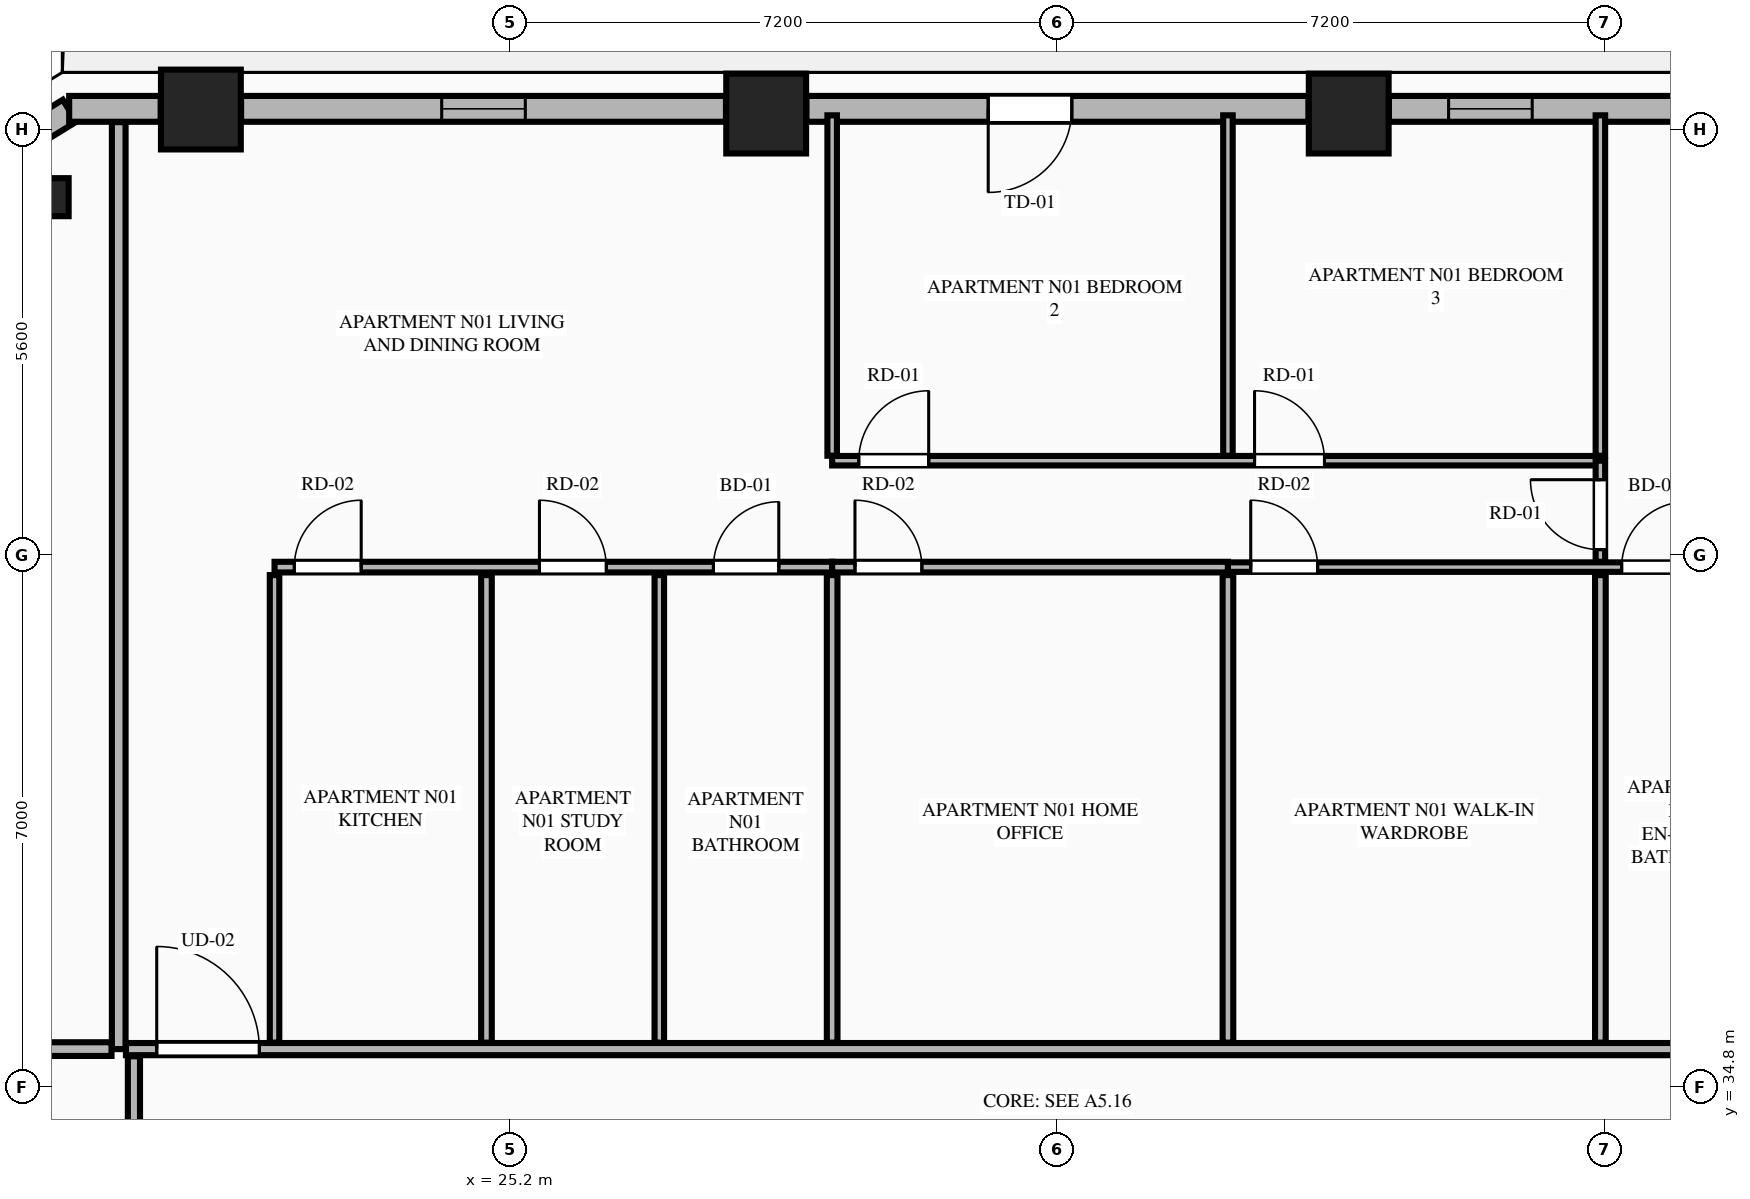
"""IFC4 building model, lengths in metres.
Left out: names, types, materials, properties, quantities, classifications, styles, units other than length and angle.
Written with IfcOpenShell. Run it as: python <this file> out.ifc"""

import sys

from ifc_helpers import new_model, si_unit, direction, frame, frame_2d, origin, origin_2d, place, context, subcontext, project, spatial, rectangle, extrude, element, fill, save


model = new_model("IFC4")
c1 = context("Model", 3, precision=1e-05, world=origin(), true_north=direction((0.0, 1.0)))
c2 = subcontext(c1, "Body", "Model", "MODEL_VIEW")
j1 = project(units=[si_unit("LENGTHUNIT", "METRE"), si_unit("PLANEANGLEUNIT", "RADIAN")], contexts=[c1])
p1 = place(None, origin())
s1 = spatial("IfcSite", under=j1, at=p1, CompositionType="ELEMENT")
p2 = place(p1, origin())
s2 = spatial("IfcBuilding", under=s1, at=p2, CompositionType="ELEMENT")
p3 = place(p2, frame((0.0, 0.0, 141.0)))
s3 = spatial("IfcBuildingStorey", under=s2, at=p3, CompositionType="ELEMENT", Elevation=141.0)
for number, where, z_axis, x_axis in (
    (1, (36.232, 47.608, 0.0), (0.0, 0.0, 1.0), (1.0, 0.0, 0.0)),
    (2, (28.568, 47.608, 0.0), (0.0, 0.0, 1.0), (1.0, 0.0, 0.0)),
    (3, (21.131, 47.661, 0.0), (0.0, 0.0, 1.0), (1.0, 0.0, 0.0)),
):
    element("IfcColumn", number, at=place(p3, frame(where, z_axis=z_axis, x_axis=x_axis)), inside=s3, PredefinedType="COLUMN", context=c2, shape_type="SweptSolid", body=[
        extrude(rectangle(XDim=1.05, YDim=1.05, at=origin_2d()), origin(), (0.0, 0.0, 1.0), 3.55),
    ])
p4 = place(p3, frame((19.141, 46.508, 0.0), z_axis=(0.0, 0.0, 1.0), x_axis=(-0.865160173452, -0.501495637342, 0.0)))
e4 = element("IfcColumn", 4, at=p4, inside=s3, PredefinedType="PILASTER", context=c2, shape_type="SweptSolid", body=[
    extrude(rectangle(XDim=0.5, YDim=0.35, at=origin_2d()), origin(), (0.0, 0.0, 1.0), 3.55),
])
p5 = place(p3, frame((19.403, 47.645, 0.0), z_axis=(0.0, 0.0, 1.0), x_axis=(-0.851798915137, -0.523868884523, 0.0)))
e5 = element("IfcWall", 5, at=p5, inside=s3, PredefinedType="STANDARD", context=c2, shape_type="SweptSolid", body=[
    extrude(rectangle(XDim=1.848, YDim=0.34, at=frame_2d((0.924, 0.0))), origin(), (0.0, 0.0, 1.0), 3.34),
])
p6 = place(p3, frame((43.14, 47.67, 0.0), z_axis=(0.0, 0.0, 1.0), x_axis=(-1.0, 0.0, 0.0)))
e6 = element("IfcWall", 6, at=p6, inside=s3, PredefinedType="STANDARD", context=c2, shape_type="SweptSolid", body=[
    extrude(rectangle(XDim=6.379, YDim=0.34, at=frame_2d((3.189, 0.0))), origin(), (0.0, 0.0, 1.0), 2.797),
])
p7 = place(p6, frame((1.192, 0.0, 0.75)))
e7 = element("IfcOpeningElement", 7, at=p7, cuts=e6, PredefinedType="OPENING", context=c2, shape_type="SweptSolid", body=[
    extrude(rectangle(XDim=1.1, YDim=1.897, at=frame_2d((0.55, 0.948))), frame((0.0, 0.18, 0.0), z_axis=(0.0, -1.0, 0.0), x_axis=(1.0, 0.0, 0.0)), (0.0, 0.0, 1.0), 0.36),
])
p8 = place(p6, frame((4.494, 0.0, 0.75)))
e8 = element("IfcOpeningElement", 8, at=p8, cuts=e6, PredefinedType="OPENING", context=c2, shape_type="SweptSolid", body=[
    extrude(rectangle(XDim=1.1, YDim=1.897, at=frame_2d((0.55, 0.948))), frame((0.0, 0.18, 0.0), z_axis=(0.0, -1.0, 0.0), x_axis=(1.0, 0.0, 0.0)), (0.0, 0.0, 1.0), 0.36),
])
p9 = place(p3, frame((35.703, 47.67, 0.0), z_axis=(0.0, 0.0, 1.0), x_axis=(-1.0, 0.0, 0.0)))
e9 = element("IfcWall", 9, at=p9, inside=s3, PredefinedType="STANDARD", context=c2, shape_type="SweptSolid", body=[
    extrude(rectangle(XDim=6.606, YDim=0.34, at=frame_2d((3.303, 0.0))), origin(), (0.0, 0.0, 1.0), 2.797),
])
p10 = place(p9, frame((3.114, 0.0, 0.0)))
e10 = element("IfcOpeningElement", 10, at=p10, cuts=e9, PredefinedType="OPENING", context=c2, shape_type="SweptSolid", body=[
    extrude(rectangle(XDim=1.1, YDim=2.25, at=frame_2d((0.55, 1.125))), frame((0.0, 0.18, 0.0), z_axis=(0.0, -1.0, 0.0), x_axis=(1.0, 0.0, 0.0)), (0.0, 0.0, 1.0), 0.36),
])
p11 = place(p3, frame((28.039, 47.67, 0.0), z_axis=(0.0, 0.0, 1.0), x_axis=(-1.0, 0.0, 0.0)))
e11 = element("IfcWall", 11, at=p11, inside=s3, PredefinedType="STANDARD", context=c2, shape_type="SweptSolid", body=[
    extrude(rectangle(XDim=6.379, YDim=0.34, at=frame_2d((3.189, 0.0))), origin(), (0.0, 0.0, 1.0), 2.797),
])
p12 = place(p11, frame((2.64, 0.0, 0.75)))
e12 = element("IfcOpeningElement", 12, at=p12, cuts=e11, PredefinedType="OPENING", context=c2, shape_type="SweptSolid", body=[
    extrude(rectangle(XDim=1.1, YDim=1.897, at=frame_2d((0.55, 0.948))), frame((0.0, 0.18, 0.0), z_axis=(0.0, -1.0, 0.0), x_axis=(1.0, 0.0, 0.0)), (0.0, 0.0, 1.0), 0.36),
])
p13 = place(p3, frame((20.602, 47.67, 0.0), z_axis=(0.0, 0.0, 1.0), x_axis=(-1.0, 0.0, 0.0)))
e13 = element("IfcWall", 13, at=p13, inside=s3, PredefinedType="STANDARD", context=c2, shape_type="SweptSolid", body=[
    extrude(rectangle(XDim=1.204, YDim=0.34, at=frame_2d((0.602, 0.0))), origin(), (0.0, 0.0, 1.0), 3.34),
])
p14 = place(p3, frame((20.05, 35.3, 0.0), z_axis=(0.0, 0.0, 1.0), x_axis=(0.0, 1.0, 0.0)))
e14 = element("IfcWall", 14, at=p14, inside=s3, PredefinedType="PARTITIONING", context=c2, shape_type="SweptSolid", body=[
    extrude(rectangle(XDim=12.195, YDim=0.18, at=frame_2d((6.098, 0.0))), origin(), (0.0, 0.0, 1.0), 3.34),
])
p15 = place(p3, frame((20.145, 35.3, 0.0), z_axis=(0.0, 0.0, 1.0), x_axis=(1.0, 0.0, 0.0)))
e15 = element("IfcWall", 15, at=p15, inside=s3, PredefinedType="PARTITIONING", context=c2, shape_type="SweptSolid", body=[
    extrude(rectangle(XDim=24.51, YDim=0.16, at=frame_2d((12.255, 0.0))), origin(), (0.0, 0.0, 1.0), 3.34),
])
p16 = place(p15, frame((0.405, 0.0, 0.0)))
e16 = element("IfcOpeningElement", 16, at=p16, cuts=e15, PredefinedType="OPENING", context=c2, shape_type="SweptSolid", body=[
    extrude(rectangle(XDim=1.35, YDim=2.35, at=frame_2d((0.675, 1.175))), frame((0.0, 0.09, 0.0), z_axis=(0.0, -1.0, 0.0), x_axis=(1.0, 0.0, 0.0)), (0.0, 0.0, 1.0), 0.18),
])
p17 = place(p3, frame((22.1, 35.385, 0.0), z_axis=(0.0, 0.0, 1.0), x_axis=(0.0, 1.0, 0.0)))
e17 = element("IfcWall", 17, at=p17, inside=s3, PredefinedType="PARTITIONING", context=c2, shape_type="SweptSolid", body=[
    extrude(rectangle(XDim=6.151, YDim=0.125, at=frame_2d((3.075, 0.0))), origin(), (0.0, 0.0, 1.0), 2.722),
])
p18 = place(p3, frame((22.1, 41.641, 0.0), z_axis=(0.0, 0.0, 1.0), x_axis=(1.0, 0.0, 0.0)))
e18 = element("IfcWall", 18, at=p18, inside=s3, PredefinedType="PLUMBINGWALL", context=c2, shape_type="SweptSolid", body=[
    extrude(rectangle(XDim=7.336, YDim=0.14, at=frame_2d((3.668, 0.0))), origin(), (0.0, 0.0, 1.0), 3.34),
])
p19 = place(p18, frame((5.774, 0.0, 0.0)))
e19 = element("IfcOpeningElement", 19, at=p19, cuts=e18, PredefinedType="OPENING", context=c2, shape_type="SweptSolid", body=[
    extrude(rectangle(XDim=0.86, YDim=2.1, at=frame_2d((0.43, 1.05))), frame((0.0, 0.08, 0.0), z_axis=(0.0, -1.0, 0.0), x_axis=(1.0, 0.0, 0.0)), (0.0, 0.0, 1.0), 0.16),
])
p20 = place(p18, frame((0.26, 0.0, 0.0)))
e20 = element("IfcOpeningElement", 20, at=p20, cuts=e18, PredefinedType="OPENING", context=c2, shape_type="SweptSolid", body=[
    extrude(rectangle(XDim=0.88, YDim=2.15, at=frame_2d((0.44, 1.075))), frame((0.0, 0.08, 0.0), z_axis=(0.0, -1.0, 0.0), x_axis=(1.0, 0.0, 0.0)), (0.0, 0.0, 1.0), 0.16),
])
p21 = place(p18, frame((3.485, 0.0, 0.0)))
e21 = element("IfcOpeningElement", 21, at=p21, cuts=e18, PredefinedType="OPENING", context=c2, shape_type="SweptSolid", body=[
    extrude(rectangle(XDim=0.88, YDim=2.15, at=frame_2d((0.44, 1.075))), frame((0.0, 0.08, 0.0), z_axis=(0.0, -1.0, 0.0), x_axis=(1.0, 0.0, 0.0)), (0.0, 0.0, 1.0), 0.16),
])
p22 = place(p3, frame((29.436, 41.641, 0.0), z_axis=(0.0, 0.0, 1.0), x_axis=(1.0, 0.0, 0.0)))
e22 = element("IfcWall", 22, at=p22, inside=s3, PredefinedType="PLUMBINGWALL", context=c2, shape_type="SweptSolid", body=[
    extrude(rectangle(XDim=5.207, YDim=0.14, at=frame_2d((2.604, 0.0))), origin(), (0.0, 0.0, 1.0), 3.34),
])
p23 = place(p22, frame((0.3, 0.0, 0.0)))
e23 = element("IfcOpeningElement", 23, at=p23, cuts=e22, PredefinedType="OPENING", context=c2, shape_type="SweptSolid", body=[
    extrude(rectangle(XDim=0.88, YDim=2.15, at=frame_2d((0.44, 1.075))), frame((0.0, 0.08, 0.0), z_axis=(0.0, -1.0, 0.0), x_axis=(1.0, 0.0, 0.0)), (0.0, 0.0, 1.0), 0.16),
])
p24 = place(p3, frame((34.643, 41.641, 0.0), z_axis=(0.0, 0.0, 1.0), x_axis=(1.0, 0.0, 0.0)))
e24 = element("IfcWall", 24, at=p24, inside=s3, PredefinedType="PARTITIONING", context=c2, shape_type="SweptSolid", body=[
    extrude(rectangle(XDim=10.012, YDim=0.125, at=frame_2d((5.006, 0.0))), origin(), (0.0, 0.0, 1.0), 3.34),
])
p25 = place(p24, frame((5.18, 0.0, 0.0)))
e25 = element("IfcOpeningElement", 25, at=p25, cuts=e24, PredefinedType="OPENING", context=c2, shape_type="SweptSolid", body=[
    extrude(rectangle(XDim=0.86, YDim=2.1, at=frame_2d((0.43, 1.05))), frame((0.0, 0.073, 0.0), z_axis=(0.0, -1.0, 0.0), x_axis=(1.0, 0.0, 0.0)), (0.0, 0.0, 1.0), 0.145),
])
p26 = place(p24, frame((7.413, 0.0, 0.0)))
e26 = element("IfcOpeningElement", 26, at=p26, cuts=e24, PredefinedType="OPENING", context=c2, shape_type="SweptSolid", body=[
    extrude(rectangle(XDim=0.88, YDim=2.15, at=frame_2d((0.44, 1.075))), frame((0.0, 0.073, 0.0), z_axis=(0.0, -1.0, 0.0), x_axis=(1.0, 0.0, 0.0)), (0.0, 0.0, 1.0), 0.145),
])
p27 = place(p24, frame((0.3, 0.0, 0.0)))
e27 = element("IfcOpeningElement", 27, at=p27, cuts=e24, PredefinedType="OPENING", context=c2, shape_type="SweptSolid", body=[
    extrude(rectangle(XDim=0.88, YDim=2.15, at=frame_2d((0.44, 1.075))), frame((0.0, 0.073, 0.0), z_axis=(0.0, -1.0, 0.0), x_axis=(1.0, 0.0, 0.0)), (0.0, 0.0, 1.0), 0.145),
])
p28 = place(p3, frame((24.888, 35.385, 0.0), z_axis=(0.0, 0.0, 1.0), x_axis=(0.0, 1.0, 0.0)))
e28 = element("IfcWall", 28, at=p28, inside=s3, PredefinedType="PLUMBINGWALL", context=c2, shape_type="SweptSolid", body=[
    extrude(rectangle(XDim=6.151, YDim=0.14, at=frame_2d((3.075, 0.0))), origin(), (0.0, 0.0, 1.0), 3.34),
])
p29 = place(p3, frame((27.162, 35.385, 0.0), z_axis=(0.0, 0.0, 1.0), x_axis=(0.0, 1.0, 0.0)))
e29 = element("IfcWall", 29, at=p29, inside=s3, PredefinedType="PARTITIONING", context=c2, shape_type="SweptSolid", body=[
    extrude(rectangle(XDim=6.151, YDim=0.125, at=frame_2d((3.075, 0.0))), origin(), (0.0, 0.0, 1.0), 3.34),
])
p30 = place(p3, frame((29.436, 43.106, 0.0), z_axis=(0.0, 0.0, 1.0), x_axis=(0.0, 1.0, 0.0)))
e30 = element("IfcWall", 30, at=p30, inside=s3, PredefinedType="PARTITIONING", context=c2, shape_type="SweptSolid", body=[
    extrude(rectangle(XDim=4.479, YDim=0.125, at=frame_2d((2.24, 0.0))), origin(), (0.0, 0.0, 1.0), 3.34),
])
p31 = place(p3, frame((29.436, 43.041, 0.0), z_axis=(0.0, 0.0, 1.0), x_axis=(1.0, 0.0, 0.0)))
e31 = element("IfcWall", 31, at=p31, inside=s3, PredefinedType="PARTITIONING", context=c2, shape_type="SweptSolid", body=[
    extrude(rectangle(XDim=10.107, YDim=0.125, at=frame_2d((5.053, 0.0))), origin(), (0.0, 0.0, 1.0), 3.34),
])
p32 = place(p31, frame((0.35, 0.0, 0.0)))
e32 = element("IfcOpeningElement", 32, at=p32, cuts=e31, PredefinedType="OPENING", context=c2, shape_type="SweptSolid", body=[
    extrude(rectangle(XDim=0.92, YDim=2.15, at=frame_2d((0.46, 1.075))), frame((0.0, 0.073, 0.0), z_axis=(0.0, -1.0, 0.0), x_axis=(1.0, 0.0, 0.0)), (0.0, 0.0, 1.0), 0.145),
])
p33 = place(p31, frame((5.557, 0.0, 0.0)))
e33 = element("IfcOpeningElement", 33, at=p33, cuts=e31, PredefinedType="OPENING", context=c2, shape_type="SweptSolid", body=[
    extrude(rectangle(XDim=0.92, YDim=2.15, at=frame_2d((0.46, 1.075))), frame((0.0, 0.073, 0.0), z_axis=(0.0, -1.0, 0.0), x_axis=(1.0, 0.0, 0.0)), (0.0, 0.0, 1.0), 0.145),
])
p34 = place(p3, frame((39.543, 41.711, 0.0), z_axis=(0.0, 0.0, 1.0), x_axis=(0.0, 1.0, 0.0)))
e34 = element("IfcWall", 34, at=p34, inside=s3, PredefinedType="PARTITIONING", context=c2, shape_type="SweptSolid", body=[
    extrude(rectangle(XDim=1.33, YDim=0.125, at=frame_2d((0.665, 0.0))), origin(), (0.0, 0.0, 1.0), 3.34),
])
p35 = place(p34, frame((0.16, 0.0, 0.0)))
e35 = element("IfcOpeningElement", 35, at=p35, cuts=e34, PredefinedType="OPENING", context=c2, shape_type="SweptSolid", body=[
    extrude(rectangle(XDim=0.92, YDim=2.15, at=frame_2d((0.46, 1.075))), frame((0.0, 0.073, 0.0), z_axis=(0.0, -1.0, 0.0), x_axis=(1.0, 0.0, 0.0)), (0.0, 0.0, 1.0), 0.145),
])
for number, where, z_axis, x_axis in (
    (36, (29.436, 35.385, 0.0), (0.0, 0.0, 1.0), (0.0, 1.0, 0.0)),
    (37, (34.643, 35.385, 0.0), (0.0, 0.0, 1.0), (0.0, 1.0, 0.0)),
):
    element("IfcWall", number, at=place(p3, frame(where, z_axis=z_axis, x_axis=x_axis)), inside=s3, PredefinedType="PLUMBINGWALL", context=c2, shape_type="SweptSolid", body=[
        extrude(rectangle(XDim=6.151, YDim=0.14, at=frame_2d((3.075, 0.0))), origin(), (0.0, 0.0, 1.0), 3.34),
    ])
for number, where, z_axis, x_axis in (
    (38, (34.643, 43.106, 0.0), (0.0, 0.0, 1.0), (0.0, 1.0, 0.0)),
    (39, (39.543, 43.106, 0.0), (0.0, 0.0, 1.0), (0.0, 1.0, 0.0)),
):
    element("IfcWall", number, at=place(p3, frame(where, z_axis=z_axis, x_axis=x_axis)), inside=s3, PredefinedType="PARTITIONING", context=c2, shape_type="SweptSolid", body=[
        extrude(rectangle(XDim=4.479, YDim=0.125, at=frame_2d((2.24, 0.0))), origin(), (0.0, 0.0, 1.0), 3.34),
    ])
p36 = place(p3, frame((39.543, 35.385, 0.0), z_axis=(0.0, 0.0, 1.0), x_axis=(0.0, 1.0, 0.0)))
e40 = element("IfcWall", 40, at=p36, inside=s3, PredefinedType="PLUMBINGWALL", context=c2, shape_type="SweptSolid", body=[
    extrude(rectangle(XDim=6.151, YDim=0.14, at=frame_2d((3.075, 0.0))), origin(), (0.0, 0.0, 1.0), 3.34),
])
p37 = place(p3, frame((12.286, 35.3, 0.0), z_axis=(0.0, 0.0, 1.0), x_axis=(1.0, 0.0, 0.0)))
e41 = element("IfcWall", 41, at=p37, inside=s3, PredefinedType="PARTITIONING", context=c2, shape_type="SweptSolid", body=[
    extrude(rectangle(XDim=7.669, YDim=0.18, at=frame_2d((3.834, 0.0))), origin(), (0.0, 0.0, 1.0), 3.34),
])
p38 = place(p3, frame((20.25, 24.491, 0.0), z_axis=(0.0, 0.0, 1.0), x_axis=(0.0, 1.0, 0.0)))
e42 = element("IfcWall", 42, at=p38, inside=s3, PredefinedType="PARTITIONING", context=c2, shape_type="SweptSolid", body=[
    extrude(rectangle(XDim=10.714, YDim=0.16, at=frame_2d((5.357, 0.0))), origin(), (0.0, 0.0, 1.0), 3.34),
])
p39 = place(p38, frame((0.4, 0.0, 0.0)))
e43 = element("IfcOpeningElement", 43, at=p39, cuts=e42, PredefinedType="OPENING", context=c2, shape_type="SweptSolid", body=[
    extrude(rectangle(XDim=1.02, YDim=2.25, at=frame_2d((0.51, 1.125))), frame((0.0, 0.09, 0.0), z_axis=(0.0, -1.0, 0.0), x_axis=(1.0, 0.0, 0.0)), (0.0, 0.0, 1.0), 0.18),
])
p40 = place(p10, origin())
e44 = element("IfcDoor", 44, at=p40, inside=s3, OperationType="SINGLE_SWING_RIGHT", PredefinedType="DOOR", context=c2, shape_type="SweptSolid", body=[
    extrude(rectangle(XDim=1.1, YDim=2.25, at=frame_2d((0.55, 1.125))), frame((0.0, 0.025, 0.0), z_axis=(0.0, -1.0, 0.0), x_axis=(1.0, 0.0, 0.0)), (0.0, 0.0, 1.0), 0.05),
])
fill(e10, e44)
p41 = place(p12, origin())
e45 = element("IfcWindow", 45, at=p41, inside=s3, PartitioningType="SINGLE_PANEL", PredefinedType="WINDOW", context=c2, shape_type="SweptSolid", body=[
    extrude(rectangle(XDim=1.1, YDim=1.897, at=frame_2d((0.55, 0.948))), frame((0.0, 0.03, 0.0), z_axis=(0.0, -1.0, 0.0), x_axis=(1.0, 0.0, 0.0)), (0.0, 0.0, 1.0), 0.06),
])
fill(e12, e45)
p42 = place(p19, origin())
e46 = element("IfcDoor", 46, at=p42, inside=s3, OperationType="SINGLE_SWING_RIGHT", PredefinedType="DOOR", context=c2, shape_type="SweptSolid", body=[
    extrude(rectangle(XDim=0.86, YDim=2.1, at=frame_2d((0.43, 1.05))), frame((0.0, 0.025, 0.0), z_axis=(0.0, -1.0, 0.0), x_axis=(1.0, 0.0, 0.0)), (0.0, 0.0, 1.0), 0.05),
])
fill(e19, e46)
p43 = place(p25, origin())
e47 = element("IfcDoor", 47, at=p43, inside=s3, OperationType="SINGLE_SWING_RIGHT", PredefinedType="DOOR", context=c2, shape_type="SweptSolid", body=[
    extrude(rectangle(XDim=0.86, YDim=2.1, at=frame_2d((0.43, 1.05))), frame((0.0, 0.025, 0.0), z_axis=(0.0, -1.0, 0.0), x_axis=(1.0, 0.0, 0.0)), (0.0, 0.0, 1.0), 0.05),
])
fill(e25, e47)
p44 = place(p16, origin())
e48 = element("IfcDoor", 48, at=p44, inside=s3, OperationType="SINGLE_SWING_LEFT", PredefinedType="DOOR", context=c2, shape_type="SweptSolid", body=[
    extrude(rectangle(XDim=1.35, YDim=2.35, at=frame_2d((0.675, 1.175))), frame((0.0, 0.025, 0.0), z_axis=(0.0, -1.0, 0.0), x_axis=(1.0, 0.0, 0.0)), (0.0, 0.0, 1.0), 0.05),
])
fill(e16, e48)
p45 = place(p20, origin())
e49 = element("IfcDoor", 49, at=p45, inside=s3, OperationType="SINGLE_SWING_RIGHT", PredefinedType="DOOR", context=c2, shape_type="SweptSolid", body=[
    extrude(rectangle(XDim=0.88, YDim=2.15, at=frame_2d((0.44, 1.075))), frame((0.0, 0.025, 0.0), z_axis=(0.0, -1.0, 0.0), x_axis=(1.0, 0.0, 0.0)), (0.0, 0.0, 1.0), 0.05),
])
fill(e20, e49)
p46 = place(p21, origin())
e50 = element("IfcDoor", 50, at=p46, inside=s3, OperationType="SINGLE_SWING_LEFT", PredefinedType="DOOR", context=c2, shape_type="SweptSolid", body=[
    extrude(rectangle(XDim=0.88, YDim=2.15, at=frame_2d((0.44, 1.075))), frame((0.0, 0.025, 0.0), z_axis=(0.0, -1.0, 0.0), x_axis=(1.0, 0.0, 0.0)), (0.0, 0.0, 1.0), 0.05),
])
fill(e21, e50)
p47 = place(p23, origin())
e51 = element("IfcDoor", 51, at=p47, inside=s3, OperationType="SINGLE_SWING_LEFT", PredefinedType="DOOR", context=c2, shape_type="SweptSolid", body=[
    extrude(rectangle(XDim=0.88, YDim=2.15, at=frame_2d((0.44, 1.075))), frame((0.0, 0.025, 0.0), z_axis=(0.0, -1.0, 0.0), x_axis=(1.0, 0.0, 0.0)), (0.0, 0.0, 1.0), 0.05),
])
fill(e23, e51)
p48 = place(p32, origin())
e52 = element("IfcDoor", 52, at=p48, inside=s3, OperationType="SINGLE_SWING_RIGHT", PredefinedType="DOOR", context=c2, shape_type="SweptSolid", body=[
    extrude(rectangle(XDim=0.92, YDim=2.15, at=frame_2d((0.46, 1.075))), frame((0.0, 0.025, 0.0), z_axis=(0.0, -1.0, 0.0), x_axis=(1.0, 0.0, 0.0)), (0.0, 0.0, 1.0), 0.05),
])
fill(e32, e52)
p49 = place(p33, origin())
e53 = element("IfcDoor", 53, at=p49, inside=s3, OperationType="SINGLE_SWING_LEFT", PredefinedType="DOOR", context=c2, shape_type="SweptSolid", body=[
    extrude(rectangle(XDim=0.92, YDim=2.15, at=frame_2d((0.46, 1.075))), frame((0.0, 0.025, 0.0), z_axis=(0.0, -1.0, 0.0), x_axis=(1.0, 0.0, 0.0)), (0.0, 0.0, 1.0), 0.05),
])
fill(e33, e53)
p50 = place(p35, origin())
e54 = element("IfcDoor", 54, at=p50, inside=s3, OperationType="SINGLE_SWING_RIGHT", PredefinedType="DOOR", context=c2, shape_type="SweptSolid", body=[
    extrude(rectangle(XDim=0.92, YDim=2.15, at=frame_2d((0.46, 1.075))), frame((0.0, 0.025, 0.0), z_axis=(0.0, -1.0, 0.0), x_axis=(1.0, 0.0, 0.0)), (0.0, 0.0, 1.0), 0.05),
])
fill(e35, e54)
p51 = place(p27, origin())
e55 = element("IfcDoor", 55, at=p51, inside=s3, OperationType="SINGLE_SWING_LEFT", PredefinedType="DOOR", context=c2, shape_type="SweptSolid", body=[
    extrude(rectangle(XDim=0.88, YDim=2.15, at=frame_2d((0.44, 1.075))), frame((0.0, 0.025, 0.0), z_axis=(0.0, -1.0, 0.0), x_axis=(1.0, 0.0, 0.0)), (0.0, 0.0, 1.0), 0.05),
])
fill(e27, e55)
p52 = place(p8, origin())
e56 = element("IfcWindow", 56, at=p52, inside=s3, PartitioningType="SINGLE_PANEL", PredefinedType="WINDOW", context=c2, shape_type="SweptSolid", body=[
    extrude(rectangle(XDim=1.1, YDim=1.897, at=frame_2d((0.55, 0.948))), frame((0.0, 0.03, 0.0), z_axis=(0.0, -1.0, 0.0), x_axis=(1.0, 0.0, 0.0)), (0.0, 0.0, 1.0), 0.06),
])
fill(e8, e56)
save(model, sys.argv[1])
